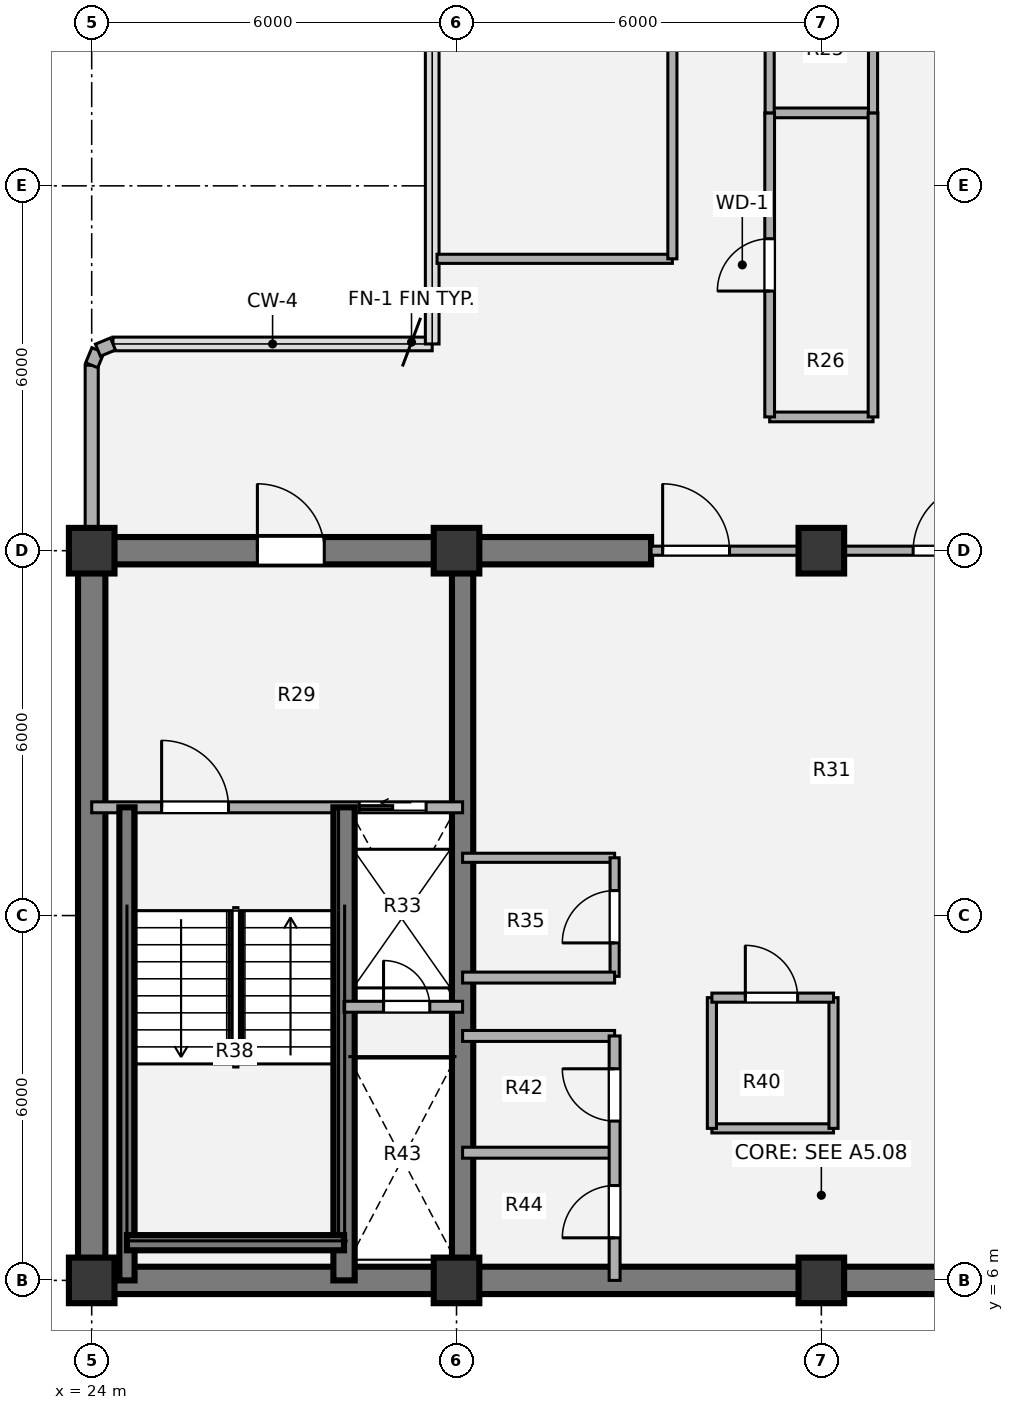
"""IFC4 building model, lengths in metres.
Left out: names, types, materials, properties, quantities, classifications, styles, units other than length and angle.
Written with IfcOpenShell. Run it as: python <this file> out.ifc"""

import sys

from ifc_helpers import new_model, si_unit, direction, frame, frame_2d, origin, origin_2d, place, context, subcontext, project, spatial, rectangle, extrude, source, transform, mapped, element, fill, save


model = new_model("IFC4")
c1 = context("Model", 3, precision=1e-05, world=origin(), true_north=direction((0.0, 1.0)))
c2 = subcontext(c1, "Body", "Model", "MODEL_VIEW")
j1 = project(units=[si_unit("LENGTHUNIT", "METRE"), si_unit("PLANEANGLEUNIT", "RADIAN")], contexts=[c1])
p1 = place(None, origin())
s1 = spatial("IfcSite", under=j1, at=p1, CompositionType="ELEMENT")
p2 = place(p1, origin())
s2 = spatial("IfcBuilding", under=s1, at=p2, CompositionType="ELEMENT")
p3 = place(p2, frame((0.0, 0.0, 171.54)))
s3 = spatial("IfcBuildingStorey", under=s2, at=p3, CompositionType="ELEMENT", Elevation=171.54)
m1 = source(origin(), c2, "Body", "SweptSolid", [
    extrude(rectangle(XDim=0.75, YDim=0.75, at=origin_2d()), origin(), (0.0, 0.0, 1.0), 3.78),
])
for number, where, z_axis, x_axis in (
    (1, (24.0, 6.0, 0.0), (0.0, 0.0, 1.0), (1.0, 0.0, 0.0)),
    (2, (30.0, 6.0, 0.0), (0.0, 0.0, 1.0), (1.0, 0.0, 0.0)),
    (3, (36.0, 6.0, 0.0), (0.0, 0.0, 1.0), (1.0, 0.0, 0.0)),
    (4, (24.0, 18.0, 0.0), (0.0, 0.0, 1.0), (1.0, 0.0, 0.0)),
    (5, (30.0, 18.0, 0.0), (0.0, 0.0, 1.0), (1.0, 0.0, 0.0)),
    (6, (36.0, 18.0, 0.0), (0.0, 0.0, 1.0), (1.0, 0.0, 0.0)),
):
    element("IfcColumn", number, at=place(p3, frame(where, z_axis=z_axis, x_axis=x_axis)), inside=s3, PredefinedType="COLUMN", context=c2, shape_type="MappedRepresentation", body=[
        mapped(m1, transform((0.0, 0.0, 0.0), x_axis=(1.0, 0.0, 0.0), y_axis=(0.0, 1.0, 0.0), z_axis=(0.0, 0.0, 1.0), scale=1.0)),
    ])
p4 = place(p3, frame((48.225, 6.0, 0.0), z_axis=(0.0, 0.0, 1.0), x_axis=(-1.0, 0.0, 0.0)))
e7 = element("IfcWall", 7, at=p4, inside=s3, PredefinedType="SHEAR", context=c2, shape_type="SweptSolid", body=[
    extrude(rectangle(XDim=24.45, YDim=0.45, at=frame_2d((12.225, 0.0))), origin(), (0.0, 0.0, 1.0), 3.78),
])
p5 = place(p3, frame((24.0, 6.0, 0.0), z_axis=(0.0, 0.0, 1.0), x_axis=(0.0, 1.0, 0.0)))
e8 = element("IfcWall", 8, at=p5, inside=s3, PredefinedType="SHEAR", context=c2, shape_type="SweptSolid", body=[
    extrude(rectangle(XDim=12.0, YDim=0.45, at=frame_2d((6.0, 0.0))), origin(), (0.0, 0.0, 1.0), 3.78),
])
p6 = place(p3, frame((23.775, 18.0, 0.0), z_axis=(0.0, 0.0, 1.0), x_axis=(1.0, 0.0, 0.0)))
e9 = element("IfcWall", 9, at=p6, inside=s3, PredefinedType="SHEAR", context=c2, shape_type="SweptSolid", body=[
    extrude(rectangle(XDim=9.425, YDim=0.45, at=frame_2d((4.712, 0.0))), origin(), (0.0, 0.0, 1.0), 3.78),
])
p7 = place(p6, frame((2.95, 0.0, 0.0)))
e10 = element("IfcOpeningElement", 10, at=p7, cuts=e9, PredefinedType="OPENING", context=c2, shape_type="SweptSolid", body=[
    extrude(rectangle(XDim=1.1, YDim=2.1, at=origin_2d()), frame((0.55, 0.235, 1.05), z_axis=(0.0, -1.0, 0.0), x_axis=(1.0, 0.0, 0.0)), (0.0, 0.0, 1.0), 0.47),
])
p8 = place(p3, frame((30.1, 6.0, 0.0), z_axis=(0.0, 0.0, 1.0), x_axis=(0.0, 1.0, 0.0)))
e11 = element("IfcWall", 11, at=p8, inside=s3, PredefinedType="SHEAR", context=c2, shape_type="SweptSolid", body=[
    extrude(rectangle(XDim=12.0, YDim=0.35, at=frame_2d((6.0, 0.0))), origin(), (0.0, 0.0, 1.0), 3.78),
])
p9 = place(p3, frame((24.0, 18.355, 0.0), z_axis=(0.0, 0.0, 1.0), x_axis=(0.0, 1.0, 0.0)))
e12 = element("IfcWall", 12, at=p9, inside=s3, PredefinedType="SOLIDWALL", context=c2, shape_type="SweptSolid", body=[
    extrude(rectangle(XDim=2.695, YDim=0.215, at=frame_2d((1.348, 0.0))), origin(), (0.0, 0.0, 1.0), 2.718),
])
p10 = place(p3, frame((24.0, 21.05, 0.0), z_axis=(0.0, 0.0, 1.0), x_axis=(0.382673670509, 0.923883575944, 0.0)))
e13 = element("IfcWall", 13, at=p10, inside=s3, PredefinedType="SOLIDWALL", context=c2, shape_type="SweptSolid", body=[
    extrude(rectangle(XDim=0.268, YDim=0.215, at=frame_2d((0.134, 0.0))), origin(), (0.0, 0.0, 1.0), 3.53),
])
p11 = place(p3, frame((24.103, 21.298, 0.0), z_axis=(0.0, 0.0, 1.0), x_axis=(0.924205486139, 0.381895560841, 0.0)))
e14 = element("IfcWall", 14, at=p11, inside=s3, PredefinedType="SOLIDWALL", context=c2, shape_type="SweptSolid", body=[
    extrude(rectangle(XDim=0.268, YDim=0.215, at=frame_2d((0.134, 0.0))), origin(), (0.0, 0.0, 1.0), 3.53),
])
p12 = place(p3, frame((30.1, 12.95, 0.0), z_axis=(0.0, 0.0, 1.0), x_axis=(1.0, 0.0, 0.0)))
e15 = element("IfcWall", 15, at=p12, inside=s3, PredefinedType="PARTITIONING", context=c2, shape_type="SweptSolid", body=[
    extrude(rectangle(XDim=2.5, YDim=0.15, at=frame_2d((1.25, 0.0))), origin(), (0.0, 0.0, 1.0), 3.5),
])
p13 = place(p3, frame((32.6, 11.0, 0.0), z_axis=(0.0, 0.0, 1.0), x_axis=(0.0, 1.0, 0.0)))
e16 = element("IfcWall", 16, at=p13, inside=s3, PredefinedType="PARTITIONING", context=c2, shape_type="SweptSolid", body=[
    extrude(rectangle(XDim=1.95, YDim=0.15, at=frame_2d((0.975, 0.0))), origin(), (0.0, 0.0, 1.0), 3.5),
])
p14 = place(p13, frame((0.55, 0.0, 0.0)))
e17 = element("IfcOpeningElement", 17, at=p14, cuts=e16, PredefinedType="OPENING", context=c2, shape_type="SweptSolid", body=[
    extrude(rectangle(XDim=0.86, YDim=2.1, at=origin_2d()), frame((0.43, 0.085, 1.05), z_axis=(0.0, -1.0, 0.0), x_axis=(1.0, 0.0, 0.0)), (0.0, 0.0, 1.0), 0.17),
])
p15 = place(p3, frame((34.2, 8.5, 0.0), z_axis=(0.0, 0.0, 1.0), x_axis=(1.0, 0.0, 0.0)))
e18 = element("IfcWall", 18, at=p15, inside=s3, PredefinedType="PARTITIONING", context=c2, shape_type="SweptSolid", body=[
    extrude(rectangle(XDim=2.0, YDim=0.15, at=frame_2d((1.0, 0.0))), origin(), (0.0, 0.0, 1.0), 3.5),
])
p16 = place(p3, frame((34.2, 8.5, 0.0), z_axis=(0.0, 0.0, 1.0), x_axis=(0.0, 1.0, 0.0)))
e19 = element("IfcWall", 19, at=p16, inside=s3, PredefinedType="PARTITIONING", context=c2, shape_type="SweptSolid", body=[
    extrude(rectangle(XDim=2.15, YDim=0.15, at=frame_2d((1.075, 0.0))), origin(), (0.0, 0.0, 1.0), 3.5),
])
p17 = place(p3, frame((36.2, 8.5, 0.0), z_axis=(0.0, 0.0, 1.0), x_axis=(0.0, 1.0, 0.0)))
e20 = element("IfcWall", 20, at=p17, inside=s3, PredefinedType="PARTITIONING", context=c2, shape_type="SweptSolid", body=[
    extrude(rectangle(XDim=2.15, YDim=0.15, at=frame_2d((1.075, 0.0))), origin(), (0.0, 0.0, 1.0), 2.715),
])
p18 = place(p3, frame((34.2, 10.65, 0.0), z_axis=(0.0, 0.0, 1.0), x_axis=(1.0, 0.0, 0.0)))
e21 = element("IfcWall", 21, at=p18, inside=s3, PredefinedType="PARTITIONING", context=c2, shape_type="SweptSolid", body=[
    extrude(rectangle(XDim=2.0, YDim=0.15, at=frame_2d((1.0, 0.0))), origin(), (0.0, 0.0, 1.0), 3.5),
])
p19 = place(p18, frame((0.55, 0.0, 0.0)))
e22 = element("IfcOpeningElement", 22, at=p19, cuts=e21, PredefinedType="OPENING", context=c2, shape_type="SweptSolid", body=[
    extrude(rectangle(XDim=0.86, YDim=2.1, at=origin_2d()), frame((0.43, 0.085, 1.05), z_axis=(0.0, -1.0, 0.0), x_axis=(1.0, 0.0, 0.0)), (0.0, 0.0, 1.0), 0.17),
])
for number, where, z_axis, x_axis in (
    (23, (30.1, 10.98, 0.0), (0.0, 0.0, 1.0), (1.0, 0.0, 0.0)),
    (24, (30.1, 8.1, 0.0), (0.0, 0.0, 1.0), (1.0, 0.0, 0.0)),
    (25, (30.1, 10.02, 0.0), (0.0, 0.0, 1.0), (1.0, 0.0, 0.0)),
):
    element("IfcWall", number, at=place(p3, frame(where, z_axis=z_axis, x_axis=x_axis)), inside=s3, PredefinedType="PARTITIONING", context=c2, shape_type="SweptSolid", body=[
        extrude(rectangle(XDim=2.5, YDim=0.18, at=frame_2d((1.25, 0.0))), origin(), (0.0, 0.0, 1.0), 3.5),
    ])
p20 = place(p3, frame((32.6, 6.0, 0.0), z_axis=(0.0, 0.0, 1.0), x_axis=(0.0, 1.0, 0.0)))
e26 = element("IfcWall", 26, at=p20, inside=s3, PredefinedType="PARTITIONING", context=c2, shape_type="SweptSolid", body=[
    extrude(rectangle(XDim=4.02, YDim=0.18, at=frame_2d((2.01, 0.0))), origin(), (0.0, 0.0, 1.0), 3.5),
])
p21 = place(p20, frame((0.7, 0.0, 0.0)))
e27 = element("IfcOpeningElement", 27, at=p21, cuts=e26, PredefinedType="OPENING", context=c2, shape_type="SweptSolid", body=[
    extrude(rectangle(XDim=0.86, YDim=2.1, at=origin_2d()), frame((0.43, 0.1, 1.05), z_axis=(0.0, -1.0, 0.0), x_axis=(1.0, 0.0, 0.0)), (0.0, 0.0, 1.0), 0.2),
])
p22 = place(p20, frame((2.62, 0.0, 0.0)))
e28 = element("IfcOpeningElement", 28, at=p22, cuts=e26, PredefinedType="OPENING", context=c2, shape_type="SweptSolid", body=[
    extrude(rectangle(XDim=0.86, YDim=2.1, at=origin_2d()), frame((0.43, 0.1, 1.05), z_axis=(0.0, -1.0, 0.0), x_axis=(1.0, 0.0, 0.0)), (0.0, 0.0, 1.0), 0.2),
])
p23 = place(p3, frame((33.2, 18.0, 0.0), z_axis=(0.0, 0.0, 1.0), x_axis=(1.0, 0.0, 0.0)))
e29 = element("IfcWall", 29, at=p23, inside=s3, PredefinedType="PARTITIONING", context=c2, shape_type="SweptSolid", body=[
    extrude(rectangle(XDim=5.6, YDim=0.15, at=frame_2d((2.8, 0.0))), origin(), (0.0, 0.0, 1.0), 2.515),
])
p24 = place(p23, frame((0.19, 0.0, 0.0)))
e30 = element("IfcOpeningElement", 30, at=p24, cuts=e29, PredefinedType="OPENING", context=c2, shape_type="SweptSolid", body=[
    extrude(rectangle(XDim=1.1, YDim=2.1, at=origin_2d()), frame((0.55, 0.085, 1.05), z_axis=(0.0, -1.0, 0.0), x_axis=(1.0, 0.0, 0.0)), (0.0, 0.0, 1.0), 0.17),
])
p25 = place(p23, frame((4.31, 0.0, 0.0)))
e31 = element("IfcOpeningElement", 31, at=p25, cuts=e29, PredefinedType="OPENING", context=c2, shape_type="SweptSolid", body=[
    extrude(rectangle(XDim=1.1, YDim=2.1, at=origin_2d()), frame((0.55, 0.085, 1.05), z_axis=(0.0, -1.0, 0.0), x_axis=(1.0, 0.0, 0.0)), (0.0, 0.0, 1.0), 0.17),
])
p26 = place(p3, frame((24.0, 13.78, 0.0), z_axis=(0.0, 0.0, 1.0), x_axis=(1.0, 0.0, 0.0)))
e32 = element("IfcWall", 32, at=p26, inside=s3, PredefinedType="PARTITIONING", context=c2, shape_type="SweptSolid", body=[
    extrude(rectangle(XDim=6.1, YDim=0.18, at=frame_2d((3.05, 0.0))), origin(), (0.0, 0.0, 1.0), 3.5),
])
p27 = place(p26, frame((1.15, 0.0, 0.0)))
e33 = element("IfcOpeningElement", 33, at=p27, cuts=e32, PredefinedType="OPENING", context=c2, shape_type="SweptSolid", body=[
    extrude(rectangle(XDim=1.1, YDim=2.1, at=origin_2d()), frame((0.55, 0.1, 1.05), z_axis=(0.0, -1.0, 0.0), x_axis=(1.0, 0.0, 0.0)), (0.0, 0.0, 1.0), 0.2),
])
p28 = place(p26, frame((4.4, 0.0, 0.0)))
e34 = element("IfcOpeningElement", 34, at=p28, cuts=e32, PredefinedType="OPENING", context=c2, shape_type="SweptSolid", body=[
    extrude(rectangle(XDim=1.1, YDim=2.1, at=origin_2d()), frame((0.55, 0.1, 1.05), z_axis=(0.0, -1.0, 0.0), x_axis=(1.0, 0.0, 0.0)), (0.0, 0.0, 1.0), 0.2),
])
p29 = place(p3, frame((28.15, 6.0, 0.0), z_axis=(0.0, 0.0, 1.0), x_axis=(0.0, 1.0, 0.0)))
e35 = element("IfcWall", 35, at=p29, inside=s3, PredefinedType="SHEAR", context=c2, shape_type="SweptSolid", body=[
    extrude(rectangle(XDim=7.78, YDim=0.35, at=frame_2d((3.89, 0.0))), origin(), (0.0, 0.0, 1.0), 3.85),
])
p30 = place(p3, frame((24.58, 6.0, 0.0), z_axis=(0.0, 0.0, 1.0), x_axis=(0.0, 1.0, 0.0)))
e36 = element("IfcWall", 36, at=p30, inside=s3, PredefinedType="SHEAR", context=c2, shape_type="SweptSolid", body=[
    extrude(rectangle(XDim=7.78, YDim=0.25, at=frame_2d((3.89, 0.0))), origin(), (0.0, 0.0, 1.0), 3.85),
])
p31 = place(p3, frame((24.58, 6.62, 0.0), z_axis=(0.0, 0.0, 1.0), x_axis=(1.0, 0.0, 0.0)))
e37 = element("IfcWall", 37, at=p31, inside=s3, PredefinedType="SHEAR", context=c2, shape_type="SweptSolid", body=[
    extrude(rectangle(XDim=3.57, YDim=0.25, at=frame_2d((1.785, 0.0))), origin(), (0.0, 0.0, 1.0), 3.85),
])
p32 = place(p3, frame((28.15, 10.5, 0.0), z_axis=(0.0, 0.0, 1.0), x_axis=(1.0, 0.0, 0.0)))
e38 = element("IfcWall", 38, at=p32, inside=s3, PredefinedType="PARTITIONING", context=c2, shape_type="SweptSolid", body=[
    extrude(rectangle(XDim=1.95, YDim=0.18, at=frame_2d((0.975, 0.0))), origin(), (0.0, 0.0, 1.0), 3.5),
])
p33 = place(p32, frame((0.65, 0.0, 0.0)))
e39 = element("IfcOpeningElement", 39, at=p33, cuts=e38, PredefinedType="OPENING", context=c2, shape_type="SweptSolid", body=[
    extrude(rectangle(XDim=0.76, YDim=2.05, at=origin_2d()), frame((0.38, 0.1, 1.025), z_axis=(0.0, -1.0, 0.0), x_axis=(1.0, 0.0, 0.0)), (0.0, 0.0, 1.0), 0.2),
])
p34 = place(p3, frame((35.15, 20.2, 0.0), z_axis=(0.0, 0.0, 1.0), x_axis=(1.0, 0.0, 0.0)))
e40 = element("IfcWall", 40, at=p34, inside=s3, PredefinedType="PLUMBINGWALL", context=c2, shape_type="SweptSolid", body=[
    extrude(rectangle(XDim=1.7, YDim=0.16, at=frame_2d((0.85, 0.0))), origin(), (0.0, 0.0, 1.0), 3.5),
])
p35 = place(p3, frame((29.68, 22.8, 0.0), z_axis=(0.0, 0.0, 1.0), x_axis=(1.0, 0.0, 0.0)))
e41 = element("IfcWall", 41, at=p35, inside=s3, PredefinedType="PARTITIONING", context=c2, shape_type="SweptSolid", body=[
    extrude(rectangle(XDim=3.87, YDim=0.15, at=frame_2d((1.935, 0.0))), origin(), (0.0, 0.0, 1.0), 3.5),
])
p36 = place(p3, frame((35.15, 25.2, 0.0), z_axis=(0.0, 0.0, 1.0), x_axis=(1.0, 0.0, 0.0)))
e42 = element("IfcWall", 42, at=p36, inside=s3, PredefinedType="PLUMBINGWALL", context=c2, shape_type="SweptSolid", body=[
    extrude(rectangle(XDim=1.7, YDim=0.16, at=frame_2d((0.85, 0.0))), origin(), (0.0, 0.0, 1.0), 3.5),
])
p37 = place(p3, frame((33.55, 22.8, 0.0), z_axis=(0.0, 0.0, 1.0), x_axis=(0.0, 1.0, 0.0)))
e43 = element("IfcWall", 43, at=p37, inside=s3, PredefinedType="PARTITIONING", context=c2, shape_type="SweptSolid", body=[
    extrude(rectangle(XDim=9.8, YDim=0.15, at=frame_2d((4.9, 0.0))), origin(), (0.0, 0.0, 1.0), 3.5),
])
p38 = place(p37, frame((4.34, 0.0, 0.0)))
e44 = element("IfcOpeningElement", 44, at=p38, cuts=e43, PredefinedType="OPENING", context=c2, shape_type="SweptSolid", body=[
    extrude(rectangle(XDim=0.86, YDim=2.1, at=origin_2d()), frame((0.43, 0.085, 1.05), z_axis=(0.0, -1.0, 0.0), x_axis=(1.0, 0.0, 0.0)), (0.0, 0.0, 1.0), 0.17),
])
p39 = place(p3, frame((35.15, 20.2, 0.0), z_axis=(0.0, 0.0, 1.0), x_axis=(0.0, 1.0, 0.0)))
e45 = element("IfcWall", 45, at=p39, inside=s3, PredefinedType="PLUMBINGWALL", context=c2, shape_type="SweptSolid", body=[
    extrude(rectangle(XDim=5.0, YDim=0.16, at=frame_2d((2.5, 0.0))), origin(), (0.0, 0.0, 1.0), 3.5),
])
p40 = place(p39, frame((2.07, 0.0, 0.0)))
e46 = element("IfcOpeningElement", 46, at=p40, cuts=e45, PredefinedType="OPENING", context=c2, shape_type="SweptSolid", body=[
    extrude(rectangle(XDim=0.86, YDim=2.1, at=origin_2d()), frame((0.43, 0.09, 1.05), z_axis=(0.0, -1.0, 0.0), x_axis=(1.0, 0.0, 0.0)), (0.0, 0.0, 1.0), 0.18),
])
p41 = place(p3, frame((35.15, 25.2, 0.0), z_axis=(0.0, 0.0, 1.0), x_axis=(0.0, 1.0, 0.0)))
e47 = element("IfcWall", 47, at=p41, inside=s3, PredefinedType="PARTITIONING", context=c2, shape_type="SweptSolid", body=[
    extrude(rectangle(XDim=15.46, YDim=0.15, at=frame_2d((7.73, 0.0))), origin(), (0.0, 0.0, 1.0), 3.5),
])
p42 = place(p3, frame((36.85, 20.2, 0.0), z_axis=(0.0, 0.0, 1.0), x_axis=(0.0, 1.0, 0.0)))
e48 = element("IfcWall", 48, at=p42, inside=s3, PredefinedType="PLUMBINGWALL", context=c2, shape_type="SweptSolid", body=[
    extrude(rectangle(XDim=5.0, YDim=0.16, at=frame_2d((2.5, 0.0))), origin(), (0.0, 0.0, 1.0), 3.5),
])
p43 = place(p3, frame((36.85, 25.2, 0.0), z_axis=(0.0, 0.0, 1.0), x_axis=(0.0, 1.0, 0.0)))
e49 = element("IfcWall", 49, at=p43, inside=s3, PredefinedType="PARTITIONING", context=c2, shape_type="SweptSolid", body=[
    extrude(rectangle(XDim=15.46, YDim=0.15, at=frame_2d((7.73, 0.0))), origin(), (0.0, 0.0, 1.0), 3.5),
])
p44 = place(p43, frame((7.205, 0.0, 0.0)))
e50 = element("IfcOpeningElement", 50, at=p44, cuts=e49, PredefinedType="OPENING", context=c2, shape_type="SweptSolid", body=[
    extrude(rectangle(XDim=1.05, YDim=2.1, at=origin_2d()), frame((0.525, 0.085, 1.05), z_axis=(0.0, -1.0, 0.0), x_axis=(1.0, 0.0, 0.0)), (0.0, 0.0, 1.0), 0.17),
])
m2 = source(origin(), c2, "Body", "SweptSolid", [
    extrude(rectangle(XDim=0.86, YDim=2.1, at=origin_2d()), frame((0.43, 0.025, 1.05), z_axis=(0.0, -1.0, 0.0), x_axis=(1.0, 0.0, 0.0)), (0.0, 0.0, 1.0), 0.05),
])
p45 = place(p14, origin())
e51 = element("IfcDoor", 51, at=p45, inside=s3, OperationType="SINGLE_SWING_LEFT", PredefinedType="DOOR", context=c2, shape_type="MappedRepresentation", body=[
    mapped(m2, transform((0.0, 0.0, 0.0), x_axis=(1.0, 0.0, 0.0), y_axis=(0.0, 1.0, 0.0), z_axis=(0.0, 0.0, 1.0), scale=1.0)),
])
fill(e17, e51)
p46 = place(p19, origin())
e52 = element("IfcDoor", 52, at=p46, inside=s3, OperationType="SINGLE_SWING_LEFT", PredefinedType="DOOR", context=c2, shape_type="MappedRepresentation", body=[
    mapped(m2, transform((0.0, 0.0, 0.0), x_axis=(1.0, 0.0, 0.0), y_axis=(0.0, 1.0, 0.0), z_axis=(0.0, 0.0, 1.0), scale=1.0)),
])
fill(e22, e52)
p47 = place(p21, origin())
e53 = element("IfcDoor", 53, at=p47, inside=s3, OperationType="SINGLE_SWING_LEFT", PredefinedType="DOOR", context=c2, shape_type="MappedRepresentation", body=[
    mapped(m2, transform((0.0, 0.0, 0.0), x_axis=(1.0, 0.0, 0.0), y_axis=(0.0, 1.0, 0.0), z_axis=(0.0, 0.0, 1.0), scale=1.0)),
])
fill(e27, e53)
p48 = place(p22, origin())
e54 = element("IfcDoor", 54, at=p48, inside=s3, OperationType="SINGLE_SWING_RIGHT", PredefinedType="DOOR", context=c2, shape_type="MappedRepresentation", body=[
    mapped(m2, transform((0.0, 0.0, 0.0), x_axis=(1.0, 0.0, 0.0), y_axis=(0.0, 1.0, 0.0), z_axis=(0.0, 0.0, 1.0), scale=1.0)),
])
fill(e28, e54)
m3 = source(origin(), c2, "Body", "SweptSolid", [
    extrude(rectangle(XDim=1.1, YDim=2.1, at=origin_2d()), frame((0.55, 0.025, 1.05), z_axis=(0.0, -1.0, 0.0), x_axis=(1.0, 0.0, 0.0)), (0.0, 0.0, 1.0), 0.05),
])
p49 = place(p24, origin())
e55 = element("IfcDoor", 55, at=p49, inside=s3, OperationType="SINGLE_SWING_LEFT", PredefinedType="DOOR", context=c2, shape_type="MappedRepresentation", body=[
    mapped(m3, transform((0.0, 0.0, 0.0), x_axis=(1.0, 0.0, 0.0), y_axis=(0.0, 1.0, 0.0), z_axis=(0.0, 0.0, 1.0), scale=1.0)),
])
fill(e30, e55)
p50 = place(p25, origin())
e56 = element("IfcDoor", 56, at=p50, inside=s3, OperationType="SINGLE_SWING_RIGHT", PredefinedType="DOOR", context=c2, shape_type="MappedRepresentation", body=[
    mapped(m3, transform((0.0, 0.0, 0.0), x_axis=(1.0, 0.0, 0.0), y_axis=(0.0, 1.0, 0.0), z_axis=(0.0, 0.0, 1.0), scale=1.0)),
])
fill(e31, e56)
m4 = source(origin(), c2, "Body", "SweptSolid", [
    extrude(rectangle(XDim=1.1, YDim=2.1, at=origin_2d()), frame((0.55, 0.025, 1.05), z_axis=(0.0, -1.0, 0.0), x_axis=(1.0, 0.0, 0.0)), (0.0, 0.0, 1.0), 0.05),
])
p51 = place(p27, origin())
e57 = element("IfcDoor", 57, at=p51, inside=s3, OperationType="SINGLE_SWING_LEFT", PredefinedType="DOOR", context=c2, shape_type="MappedRepresentation", body=[
    mapped(m4, transform((0.0, 0.0, 0.0), x_axis=(1.0, 0.0, 0.0), y_axis=(0.0, 1.0, 0.0), z_axis=(0.0, 0.0, 1.0), scale=1.0)),
])
fill(e33, e57)
m5 = source(origin(), c2, "Body", "SweptSolid", [
    extrude(rectangle(XDim=1.1, YDim=2.1, at=origin_2d()), frame((0.55, 0.025, 1.05), z_axis=(0.0, -1.0, 0.0), x_axis=(1.0, 0.0, 0.0)), (0.0, 0.0, 1.0), 0.05),
])
p52 = place(p28, origin())
e58 = element("IfcDoor", 58, at=p52, inside=s3, OperationType="SLIDING_TO_LEFT", PredefinedType="DOOR", context=c2, shape_type="MappedRepresentation", body=[
    mapped(m5, transform((0.0, 0.0, 0.0), x_axis=(1.0, 0.0, 0.0), y_axis=(0.0, 1.0, 0.0), z_axis=(0.0, 0.0, 1.0), scale=1.0)),
])
fill(e34, e58)
m6 = source(origin(), c2, "Body", "SweptSolid", [
    extrude(rectangle(XDim=0.76, YDim=2.05, at=origin_2d()), frame((0.38, 0.025, 1.025), z_axis=(0.0, -1.0, 0.0), x_axis=(1.0, 0.0, 0.0)), (0.0, 0.0, 1.0), 0.05),
])
p53 = place(p33, origin())
e59 = element("IfcDoor", 59, at=p53, inside=s3, OperationType="SINGLE_SWING_LEFT", PredefinedType="DOOR", context=c2, shape_type="MappedRepresentation", body=[
    mapped(m6, transform((0.0, 0.0, 0.0), x_axis=(1.0, 0.0, 0.0), y_axis=(0.0, 1.0, 0.0), z_axis=(0.0, 0.0, 1.0), scale=1.0)),
])
fill(e39, e59)
p54 = place(p7, origin())
e60 = element("IfcDoor", 60, at=p54, inside=s3, OperationType="SINGLE_SWING_LEFT", PredefinedType="DOOR", context=c2, shape_type="MappedRepresentation", body=[
    mapped(m3, transform((0.0, 0.0, 0.0), x_axis=(1.0, 0.0, 0.0), y_axis=(0.0, 1.0, 0.0), z_axis=(0.0, 0.0, 1.0), scale=1.0)),
])
fill(e10, e60)
m7 = source(origin(), c2, "Body", "SweptSolid", [
    extrude(rectangle(XDim=0.86, YDim=2.1, at=origin_2d()), frame((0.43, 0.025, 1.05), z_axis=(0.0, -1.0, 0.0), x_axis=(1.0, 0.0, 0.0)), (0.0, 0.0, 1.0), 0.05),
])
p55 = place(p40, origin())
e61 = element("IfcDoor", 61, at=p55, inside=s3, OperationType="SINGLE_SWING_LEFT", PredefinedType="DOOR", context=c2, shape_type="MappedRepresentation", body=[
    mapped(m7, transform((0.0, 0.0, 0.0), x_axis=(1.0, 0.0, 0.0), y_axis=(0.0, 1.0, 0.0), z_axis=(0.0, 0.0, 1.0), scale=1.0)),
])
fill(e46, e61)
save(model, sys.argv[1])
